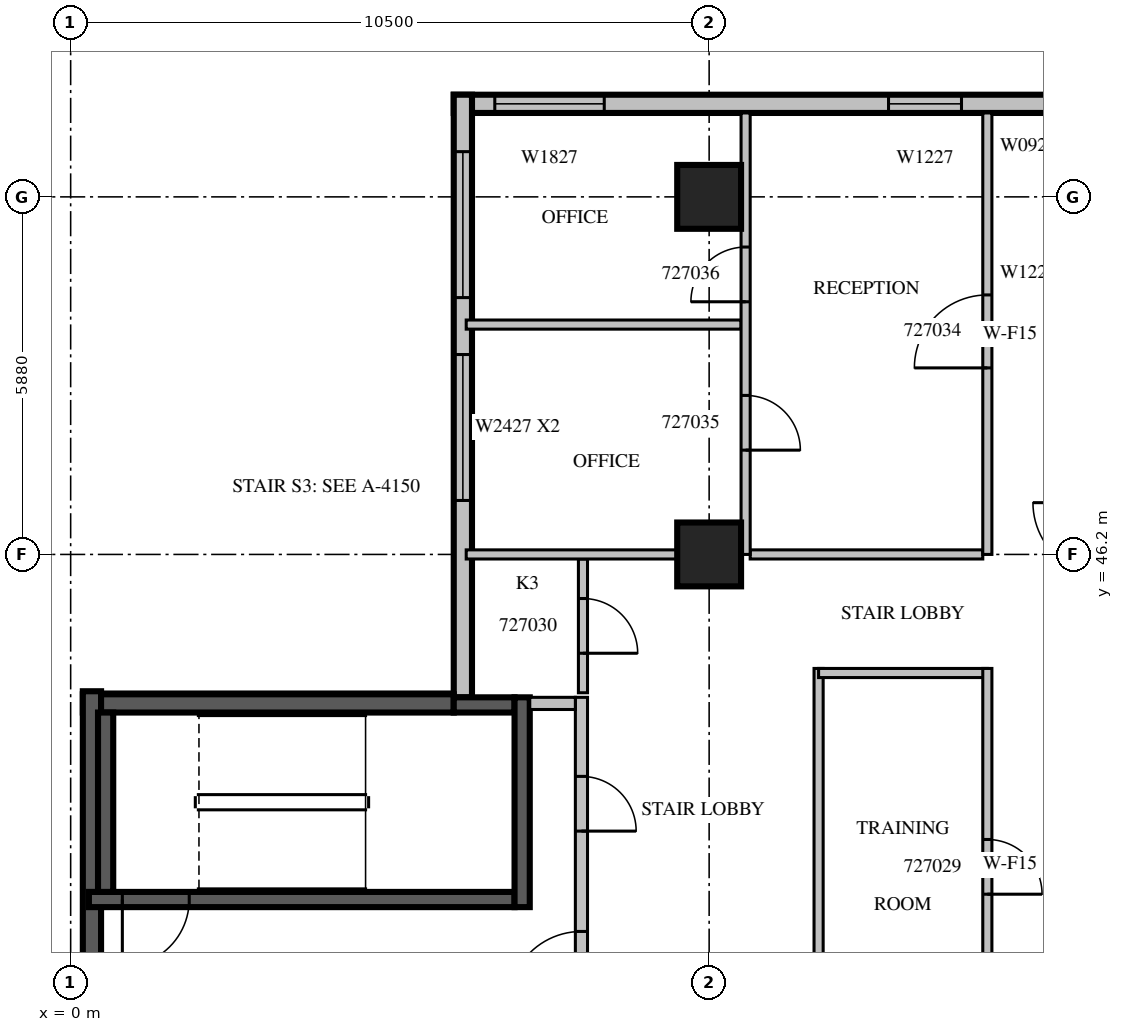
"""IFC4 building model, lengths in metres.
Left out: names, types, materials, properties, quantities, classifications, styles, units other than length and angle.
Written with IfcOpenShell. Run it as: python <this file> out.ifc"""

import sys

from ifc_helpers import new_model, si_unit, direction, frame, frame_2d, origin, origin_2d, place, context, subcontext, project, spatial, rectangle, extrude, source, transform, mapped, element, fill, save


model = new_model("IFC4")
c1 = context("Model", 3, precision=1e-05, world=origin(), true_north=direction((0.0, 1.0)))
c2 = subcontext(c1, "Body", "Model", "MODEL_VIEW")
j1 = project(units=[si_unit("LENGTHUNIT", "METRE"), si_unit("PLANEANGLEUNIT", "RADIAN")], contexts=[c1])
p1 = place(None, origin())
s1 = spatial("IfcSite", under=j1, at=p1, CompositionType="ELEMENT")
p2 = place(p1, origin())
s2 = spatial("IfcBuilding", under=s1, at=p2, CompositionType="ELEMENT")
p3 = place(p2, frame((0.0, 0.0, 124.5)))
s3 = spatial("IfcBuildingStorey", under=s2, at=p3, CompositionType="ELEMENT", Elevation=124.5)
m1 = source(origin(), c2, "Body", "SweptSolid", [
    extrude(rectangle(XDim=1.05, YDim=1.05, at=origin_2d()), origin(), (0.0, 0.0, 1.0), 4.2),
])
for number, where, z_axis, x_axis in (
    (1, (10.5, 46.2, 0.0), (0.0, 0.0, 1.0), (1.0, 0.0, 0.0)),
    (2, (10.5, 52.08, 0.0), (0.0, 0.0, 1.0), (1.0, 0.0, 0.0)),
):
    element("IfcColumn", number, at=place(p3, frame(where, z_axis=z_axis, x_axis=x_axis)), inside=s3, PredefinedType="COLUMN", context=c2, shape_type="MappedRepresentation", body=[
        mapped(m1, transform((0.0, 0.0, 0.0), scale=1.0)),
    ])
m2 = source(origin(), c2, "Body", "SweptSolid", [
    extrude(rectangle(XDim=10.5, YDim=0.3, at=frame_2d((5.25, 0.0))), origin(), (0.0, 0.0, 1.0), 3.8),
])
p4 = place(p3, frame((16.8, 53.61, 0.0), z_axis=(0.0, 0.0, 1.0), x_axis=(-1.0, 0.0, 0.0)))
e3 = element("IfcWall", 3, at=p4, inside=s3, PredefinedType="STANDARD", context=c2, shape_type="MappedRepresentation", body=[
    mapped(m2, transform((0.0, 0.0, 0.0), scale=1.0)),
])
m3 = source(origin(), c2, "Body", "SweptSolid", [
    extrude(rectangle(XDim=1.2, YDim=2.7, at=frame_2d((0.6, 1.35))), frame((0.0, 0.16, 0.0), z_axis=(0.0, -1.0, 0.0), x_axis=(1.0, 0.0, 0.0)), (0.0, 0.0, 1.0), 0.32),
])
p5 = place(p4, frame((2.15, 0.0, 0.6)))
e4 = element("IfcOpeningElement", 4, at=p5, cuts=e3, PredefinedType="OPENING", context=c2, shape_type="MappedRepresentation", body=[
    mapped(m3, transform((0.0, 0.0, 0.0), scale=1.0)),
])
m4 = source(origin(), c2, "Body", "SweptSolid", [
    extrude(rectangle(XDim=1.8, YDim=2.7, at=frame_2d((0.9, 1.35))), frame((0.0, 0.16, 0.0), z_axis=(0.0, -1.0, 0.0), x_axis=(1.0, 0.0, 0.0)), (0.0, 0.0, 1.0), 0.32),
])
p6 = place(p4, frame((8.025, 0.0, 0.6)))
e5 = element("IfcOpeningElement", 5, at=p6, cuts=e3, PredefinedType="OPENING", context=c2, shape_type="MappedRepresentation", body=[
    mapped(m4, transform((0.0, 0.0, 0.0), scale=1.0)),
])
m5 = source(origin(), c2, "Body", "SweptSolid", [
    extrude(rectangle(XDim=9.91, YDim=0.3, at=frame_2d((4.955, 0.0))), origin(), (0.0, 0.0, 1.0), 3.8),
])
p7 = place(p3, frame((6.45, 53.76, 0.0), z_axis=(0.0, 0.0, 1.0), x_axis=(0.0, -1.0, 0.0)))
e6 = element("IfcWall", 6, at=p7, inside=s3, PredefinedType="STANDARD", context=c2, shape_type="MappedRepresentation", body=[
    mapped(m5, transform((0.0, 0.0, 0.0), scale=1.0)),
])
m6 = source(origin(), c2, "Body", "SweptSolid", [
    extrude(rectangle(XDim=2.4, YDim=2.7, at=frame_2d((1.2, 1.35))), frame((0.0, 0.16, 0.0), z_axis=(0.0, -1.0, 0.0), x_axis=(1.0, 0.0, 0.0)), (0.0, 0.0, 1.0), 0.32),
])
p8 = place(p7, frame((4.272, 0.0, 0.6)))
e7 = element("IfcOpeningElement", 7, at=p8, cuts=e6, PredefinedType="OPENING", context=c2, shape_type="MappedRepresentation", body=[
    mapped(m6, transform((0.0, 0.0, 0.0), scale=1.0)),
])
p9 = place(p7, frame((0.936, 0.0, 0.6)))
e8 = element("IfcOpeningElement", 8, at=p9, cuts=e6, PredefinedType="OPENING", context=c2, shape_type="MappedRepresentation", body=[
    mapped(m6, transform((0.0, 0.0, 0.0), scale=1.0)),
])
m7 = source(origin(), c2, "Body", "SweptSolid", [
    extrude(rectangle(XDim=6.1, YDim=0.3, at=frame_2d((3.05, 0.0))), origin(), (0.0, 0.0, 1.0), 3.8),
])
p10 = place(p3, frame((6.3, 43.75, 0.0), z_axis=(0.0, 0.0, 1.0), x_axis=(-1.0, 0.0, 0.0)))
e9 = element("IfcWall", 9, at=p10, inside=s3, PredefinedType="SOLIDWALL", context=c2, shape_type="MappedRepresentation", body=[
    mapped(m7, transform((0.0, 0.0, 0.0), scale=1.0)),
])
m8 = source(origin(), c2, "Body", "SweptSolid", [
    extrude(rectangle(XDim=5.65, YDim=0.3, at=frame_2d((2.825, 0.0))), origin(), (0.0, 0.0, 1.0), 3.8),
])
p11 = place(p3, frame((0.35, 43.95, 0.0), z_axis=(0.0, 0.0, 1.0), x_axis=(0.0, -1.0, 0.0)))
e10 = element("IfcWall", 10, at=p11, inside=s3, PredefinedType="SOLIDWALL", context=c2, shape_type="MappedRepresentation", body=[
    mapped(m8, transform((0.0, 0.0, 0.0), scale=1.0)),
])
m9 = source(origin(), c2, "Body", "SweptSolid", [
    extrude(rectangle(XDim=7.0, YDim=0.25, at=frame_2d((3.5, 0.0))), origin(), (0.0, 0.0, 1.0), 3.8),
])
p12 = place(p3, frame((0.3, 40.525, 0.0), z_axis=(0.0, 0.0, 1.0), x_axis=(1.0, 0.0, 0.0)))
e11 = element("IfcWall", 11, at=p12, inside=s3, PredefinedType="SOLIDWALL", context=c2, shape_type="MappedRepresentation", body=[
    mapped(m9, transform((0.0, 0.0, 0.0), scale=1.0)),
])
m10 = source(origin(), c2, "Body", "SweptSolid", [
    extrude(rectangle(XDim=1.1, YDim=2.1, at=frame_2d((0.55, 1.05))), frame((0.0, 0.135, 0.0), z_axis=(0.0, -1.0, 0.0), x_axis=(1.0, 0.0, 0.0)), (0.0, 0.0, 1.0), 0.27),
])
p13 = place(p12, frame((0.55, 0.0, 0.0)))
e12 = element("IfcOpeningElement", 12, at=p13, cuts=e11, PredefinedType="OPENING", context=c2, shape_type="MappedRepresentation", body=[
    mapped(m10, transform((0.0, 0.0, 0.0), scale=1.0)),
])
m11 = source(origin(), c2, "Body", "SweptSolid", [
    extrude(rectangle(XDim=1.0, YDim=0.25, at=frame_2d((0.5, 0.0))), origin(), (0.0, 0.0, 1.0), 3.8),
])
p14 = place(p3, frame((6.3, 43.725, 0.0), z_axis=(0.0, 0.0, 1.0), x_axis=(1.0, 0.0, 0.0)))
e13 = element("IfcWall", 13, at=p14, inside=s3, PredefinedType="SOLIDWALL", context=c2, shape_type="MappedRepresentation", body=[
    mapped(m11, transform((0.0, 0.0, 0.0), scale=1.0)),
])
m12 = source(origin(), c2, "Body", "SweptSolid", [
    extrude(rectangle(XDim=3.45, YDim=0.25, at=frame_2d((1.725, 0.0))), origin(), (0.0, 0.0, 1.0), 3.8),
])
p15 = place(p3, frame((7.425, 40.4, 0.0), z_axis=(0.0, 0.0, 1.0), x_axis=(0.0, 1.0, 0.0)))
e14 = element("IfcWall", 14, at=p15, inside=s3, PredefinedType="SOLIDWALL", context=c2, shape_type="MappedRepresentation", body=[
    mapped(m12, transform((0.0, 0.0, 0.0), scale=1.0)),
])
m13 = source(origin(), c2, "Body", "SweptSolid", [
    extrude(rectangle(XDim=2.95, YDim=0.25, at=frame_2d((1.475, 0.0))), origin(), (0.0, 0.0, 1.0), 3.8),
])
p16 = place(p3, frame((0.575, 40.65, 0.0), z_axis=(0.0, 0.0, 1.0), x_axis=(0.0, 1.0, 0.0)))
e15 = element("IfcWall", 15, at=p16, inside=s3, PredefinedType="SOLIDWALL", context=c2, shape_type="MappedRepresentation", body=[
    mapped(m13, transform((0.0, 0.0, 0.0), scale=1.0)),
])
m14 = source(origin(), c2, "Body", "SweptSolid", [
    extrude(rectangle(XDim=5.45, YDim=0.2, at=frame_2d((2.725, 0.0))), origin(), (0.0, 0.0, 1.0), 3.8),
])
p17 = place(p3, frame((8.4, 38.4, 0.0), z_axis=(0.0, 0.0, 1.0), x_axis=(0.0, 1.0, 0.0)))
e16 = element("IfcWall", 16, at=p17, inside=s3, PredefinedType="PARTITIONING", context=c2, shape_type="MappedRepresentation", body=[
    mapped(m14, transform((0.0, 0.0, 0.0), scale=1.0)),
])
m15 = source(origin(), c2, "Body", "SweptSolid", [
    extrude(rectangle(XDim=1.2, YDim=2.1, at=frame_2d((0.6, 1.05))), frame((0.0, 0.11, 0.0), z_axis=(0.0, -1.0, 0.0), x_axis=(1.0, 0.0, 0.0)), (0.0, 0.0, 1.0), 0.22),
])
p18 = place(p17, frame((0.4, 0.0, 0.0)))
e17 = element("IfcOpeningElement", 17, at=p18, cuts=e16, PredefinedType="OPENING", context=c2, shape_type="MappedRepresentation", body=[
    mapped(m15, transform((0.0, 0.0, 0.0), scale=1.0)),
])
m16 = source(origin(), c2, "Body", "SweptSolid", [
    extrude(rectangle(XDim=0.9, YDim=2.1, at=frame_2d((0.45, 1.05))), frame((0.0, 0.11, 0.0), z_axis=(0.0, -1.0, 0.0), x_axis=(1.0, 0.0, 0.0)), (0.0, 0.0, 1.0), 0.22),
])
p19 = place(p17, frame((3.25, 0.0, 0.0)))
e18 = element("IfcOpeningElement", 18, at=p19, cuts=e16, PredefinedType="OPENING", context=c2, shape_type="MappedRepresentation", body=[
    mapped(m16, transform((0.0, 0.0, 0.0), scale=1.0)),
])
m17 = source(origin(), c2, "Body", "SweptSolid", [
    extrude(rectangle(XDim=0.75, YDim=0.2, at=frame_2d((0.375, 0.0))), origin(), (0.0, 0.0, 1.0), 3.8),
])
p20 = place(p3, frame((7.55, 43.75, 0.0), z_axis=(0.0, 0.0, 1.0), x_axis=(1.0, 0.0, 0.0)))
e19 = element("IfcWall", 19, at=p20, inside=s3, PredefinedType="PARTITIONING", context=c2, shape_type="MappedRepresentation", body=[
    mapped(m17, transform((0.0, 0.0, 0.0), scale=1.0)),
])
m18 = source(origin(), c2, "Body", "SweptSolid", [
    extrude(rectangle(XDim=6.45, YDim=0.15, at=frame_2d((3.225, 0.0))), origin(), (0.0, 0.0, 1.0), 3.8),
])
p21 = place(p3, frame((12.3, 44.325, 0.0), z_axis=(0.0, 0.0, 1.0), x_axis=(0.0, -1.0, 0.0)))
e20 = element("IfcWall", 20, at=p21, inside=s3, PredefinedType="PARTITIONING", context=c2, shape_type="MappedRepresentation", body=[
    mapped(m18, transform((0.0, 0.0, 0.0), scale=1.0)),
])
m19 = source(origin(), c2, "Body", "SweptSolid", [
    extrude(rectangle(XDim=2.775, YDim=0.15, at=frame_2d((1.387, 0.0))), origin(), (0.0, 0.0, 1.0), 3.8),
])
p22 = place(p3, frame((15.075, 44.25, 0.0), z_axis=(0.0, 0.0, 1.0), x_axis=(-1.0, 0.0, 0.0)))
e21 = element("IfcWall", 21, at=p22, inside=s3, PredefinedType="PARTITIONING", context=c2, shape_type="MappedRepresentation", body=[
    mapped(m19, transform((0.0, 0.0, 0.0), scale=1.0)),
])
p23 = place(p3, frame((15.075, 37.875, 0.0), z_axis=(0.0, 0.0, 1.0), x_axis=(0.0, 1.0, 0.0)))
e22 = element("IfcWall", 22, at=p23, inside=s3, PredefinedType="PARTITIONING", context=c2, shape_type="MappedRepresentation", body=[
    mapped(m18, transform((0.0, 0.0, 0.0), scale=1.0)),
])
m20 = source(origin(), c2, "Body", "SweptSolid", [
    extrude(rectangle(XDim=0.9, YDim=2.1, at=frame_2d((0.45, 1.05))), frame((0.0, 0.085, 0.0), z_axis=(0.0, -1.0, 0.0), x_axis=(1.0, 0.0, 0.0)), (0.0, 0.0, 1.0), 0.17),
])
p24 = place(p23, frame((2.737, 0.0, 0.0)))
e23 = element("IfcOpeningElement", 23, at=p24, cuts=e22, PredefinedType="OPENING", context=c2, shape_type="MappedRepresentation", body=[
    mapped(m20, transform((0.0, 0.0, 0.0), scale=1.0)),
])
m21 = source(origin(), c2, "Body", "SweptSolid", [
    extrude(rectangle(XDim=2.2, YDim=0.15, at=frame_2d((1.1, 0.0))), origin(), (0.0, 0.0, 1.0), 3.8),
])
p25 = place(p3, frame((8.425, 43.925, 0.0), z_axis=(0.0, 0.0, 1.0), x_axis=(0.0, 1.0, 0.0)))
e24 = element("IfcWall", 24, at=p25, inside=s3, PredefinedType="PARTITIONING", context=c2, shape_type="MappedRepresentation", body=[
    mapped(m21, transform((0.0, 0.0, 0.0), scale=1.0)),
])
p26 = place(p25, frame((0.65, 0.0, 0.0)))
e25 = element("IfcOpeningElement", 25, at=p26, cuts=e24, PredefinedType="OPENING", context=c2, shape_type="MappedRepresentation", body=[
    mapped(m20, transform((0.0, 0.0, 0.0), scale=1.0)),
])
m22 = source(origin(), c2, "Body", "SweptSolid", [
    extrude(rectangle(XDim=4.52, YDim=0.15, at=frame_2d((2.26, 0.0))), origin(), (0.0, 0.0, 1.0), 3.8),
])
p27 = place(p3, frame((11.025, 49.98, 0.0), z_axis=(0.0, 0.0, 1.0), x_axis=(-1.0, 0.0, 0.0)))
e26 = element("IfcWall", 26, at=p27, inside=s3, PredefinedType="PARTITIONING", context=c2, shape_type="MappedRepresentation", body=[
    mapped(m22, transform((0.0, 0.0, 0.0), scale=1.0)),
])
m23 = source(origin(), c2, "Body", "SweptSolid", [
    extrude(rectangle(XDim=3.471, YDim=0.15, at=frame_2d((1.736, 0.0))), origin(), (0.0, 0.0, 1.0), 3.8),
])
p28 = place(p3, frame((9.976, 46.2, 0.0), z_axis=(0.0, 0.0, 1.0), x_axis=(-1.0, 0.0, 0.0)))
e27 = element("IfcWall", 27, at=p28, inside=s3, PredefinedType="PARTITIONING", context=c2, shape_type="MappedRepresentation", body=[
    mapped(m23, transform((0.0, 0.0, 0.0), scale=1.0)),
])
m24 = source(origin(), c2, "Body", "SweptSolid", [
    extrude(rectangle(XDim=3.825, YDim=0.15, at=frame_2d((1.913, 0.0))), origin(), (0.0, 0.0, 1.0), 3.8),
])
p29 = place(p3, frame((15.0, 46.2, 0.0), z_axis=(0.0, 0.0, 1.0), x_axis=(-1.0, 0.0, 0.0)))
e28 = element("IfcWall", 28, at=p29, inside=s3, PredefinedType="PARTITIONING", context=c2, shape_type="MappedRepresentation", body=[
    mapped(m24, transform((0.0, 0.0, 0.0), scale=1.0)),
])
m25 = source(origin(), c2, "Body", "SweptSolid", [
    extrude(rectangle(XDim=7.26, YDim=0.15, at=frame_2d((3.63, 0.0))), origin(), (0.0, 0.0, 1.0), 3.8),
])
p30 = place(p3, frame((11.1, 46.2, 0.0), z_axis=(0.0, 0.0, 1.0), x_axis=(0.0, 1.0, 0.0)))
e29 = element("IfcWall", 29, at=p30, inside=s3, PredefinedType="PARTITIONING", context=c2, shape_type="MappedRepresentation", body=[
    mapped(m25, transform((0.0, 0.0, 0.0), scale=1.0)),
])
p31 = place(p30, frame((1.715, 0.0, 0.0)))
e30 = element("IfcOpeningElement", 30, at=p31, cuts=e29, PredefinedType="OPENING", context=c2, shape_type="MappedRepresentation", body=[
    mapped(m20, transform((0.0, 0.0, 0.0), scale=1.0)),
])
p32 = place(p30, frame((4.155, 0.0, 0.0)))
e31 = element("IfcOpeningElement", 31, at=p32, cuts=e29, PredefinedType="OPENING", context=c2, shape_type="MappedRepresentation", body=[
    mapped(m20, transform((0.0, 0.0, 0.0), scale=1.0)),
])
p33 = place(p3, frame((15.075, 46.2, 0.0), z_axis=(0.0, 0.0, 1.0), x_axis=(0.0, 1.0, 0.0)))
e32 = element("IfcWall", 32, at=p33, inside=s3, PredefinedType="PARTITIONING", context=c2, shape_type="MappedRepresentation", body=[
    mapped(m25, transform((0.0, 0.0, 0.0), scale=1.0)),
])
m26 = source(origin(), c2, "Body", "SweptSolid", [
    extrude(rectangle(XDim=1.2, YDim=2.1, at=frame_2d((0.6, 1.05))), frame((0.0, 0.085, 0.0), z_axis=(0.0, -1.0, 0.0), x_axis=(1.0, 0.0, 0.0)), (0.0, 0.0, 1.0), 0.17),
])
p34 = place(p33, frame((3.067, 0.0, 0.0)))
e33 = element("IfcOpeningElement", 33, at=p34, cuts=e32, PredefinedType="OPENING", context=c2, shape_type="MappedRepresentation", body=[
    mapped(m26, transform((0.0, 0.0, 0.0), scale=1.0)),
])
m27 = source(origin(), c2, "Body", "SweptSolid", [
    extrude(rectangle(XDim=1.2, YDim=2.7, at=frame_2d((0.6, 1.35))), frame((0.0, 0.03, 0.0), z_axis=(0.0, -1.0, 0.0), x_axis=(1.0, 0.0, 0.0)), (0.0, 0.0, 1.0), 0.06),
])
p35 = place(p5, origin())
e34 = element("IfcWindow", 34, at=p35, inside=s3, PartitioningType="SINGLE_PANEL", PredefinedType="WINDOW", context=c2, shape_type="MappedRepresentation", body=[
    mapped(m27, transform((0.0, 0.0, 0.0), scale=1.0)),
])
fill(e4, e34)
m28 = source(origin(), c2, "Body", "SweptSolid", [
    extrude(rectangle(XDim=1.8, YDim=2.7, at=frame_2d((0.9, 1.35))), frame((0.0, 0.03, 0.0), z_axis=(0.0, -1.0, 0.0), x_axis=(1.0, 0.0, 0.0)), (0.0, 0.0, 1.0), 0.06),
])
p36 = place(p6, origin())
e35 = element("IfcWindow", 35, at=p36, inside=s3, PartitioningType="SINGLE_PANEL", PredefinedType="WINDOW", context=c2, shape_type="MappedRepresentation", body=[
    mapped(m28, transform((0.0, 0.0, 0.0), scale=1.0)),
])
fill(e5, e35)
m29 = source(origin(), c2, "Body", "SweptSolid", [
    extrude(rectangle(XDim=2.4, YDim=2.7, at=frame_2d((1.2, 1.35))), frame((0.0, 0.03, 0.0), z_axis=(0.0, -1.0, 0.0), x_axis=(1.0, 0.0, 0.0)), (0.0, 0.0, 1.0), 0.06),
])
p37 = place(p8, origin())
e36 = element("IfcWindow", 36, at=p37, inside=s3, PartitioningType="SINGLE_PANEL", PredefinedType="WINDOW", context=c2, shape_type="MappedRepresentation", body=[
    mapped(m29, transform((0.0, 0.0, 0.0), scale=1.0)),
])
fill(e7, e36)
p38 = place(p9, origin())
e37 = element("IfcWindow", 37, at=p38, inside=s3, PartitioningType="SINGLE_PANEL", PredefinedType="WINDOW", context=c2, shape_type="MappedRepresentation", body=[
    mapped(m29, transform((0.0, 0.0, 0.0), scale=1.0)),
])
fill(e8, e37)
m30 = source(origin(), c2, "Body", "SweptSolid", [
    extrude(rectangle(XDim=1.1, YDim=2.1, at=frame_2d((0.55, 1.05))), frame((0.0, 0.025, 0.0), z_axis=(0.0, -1.0, 0.0), x_axis=(1.0, 0.0, 0.0)), (0.0, 0.0, 1.0), 0.05),
])
p39 = place(p13, origin())
e38 = element("IfcDoor", 38, at=p39, inside=s3, OperationType="SINGLE_SWING_RIGHT", PredefinedType="DOOR", context=c2, shape_type="MappedRepresentation", body=[
    mapped(m30, transform((0.0, 0.0, 0.0), scale=1.0)),
])
fill(e12, e38)
m31 = source(origin(), c2, "Body", "SweptSolid", [
    extrude(rectangle(XDim=1.2, YDim=2.1, at=frame_2d((0.6, 1.05))), frame((0.0, 0.025, 0.0), z_axis=(0.0, -1.0, 0.0), x_axis=(1.0, 0.0, 0.0)), (0.0, 0.0, 1.0), 0.05),
])
p40 = place(p18, origin())
e39 = element("IfcDoor", 39, at=p40, inside=s3, OperationType="SINGLE_SWING_LEFT", PredefinedType="DOOR", context=c2, shape_type="MappedRepresentation", body=[
    mapped(m31, transform((0.0, 0.0, 0.0), scale=1.0)),
])
fill(e17, e39)
m32 = source(origin(), c2, "Body", "SweptSolid", [
    extrude(rectangle(XDim=0.9, YDim=2.1, at=frame_2d((0.45, 1.05))), frame((0.0, 0.025, 0.0), z_axis=(0.0, -1.0, 0.0), x_axis=(1.0, 0.0, 0.0)), (0.0, 0.0, 1.0), 0.05),
])
p41 = place(p19, origin())
e40 = element("IfcDoor", 40, at=p41, inside=s3, OperationType="SINGLE_SWING_RIGHT", PredefinedType="DOOR", context=c2, shape_type="MappedRepresentation", body=[
    mapped(m32, transform((0.0, 0.0, 0.0), scale=1.0)),
])
fill(e18, e40)
p42 = place(p24, origin())
e41 = element("IfcDoor", 41, at=p42, inside=s3, OperationType="SINGLE_SWING_RIGHT", PredefinedType="DOOR", context=c2, shape_type="MappedRepresentation", body=[
    mapped(m32, transform((0.0, 0.0, 0.0), scale=1.0)),
])
fill(e23, e41)
p43 = place(p26, origin())
e42 = element("IfcDoor", 42, at=p43, inside=s3, OperationType="SINGLE_SWING_RIGHT", PredefinedType="DOOR", context=c2, shape_type="MappedRepresentation", body=[
    mapped(m32, transform((0.0, 0.0, 0.0), scale=1.0)),
])
fill(e25, e42)
p44 = place(p34, origin())
e43 = element("IfcDoor", 43, at=p44, inside=s3, OperationType="SINGLE_SWING_LEFT", PredefinedType="DOOR", context=c2, shape_type="MappedRepresentation", body=[
    mapped(m31, transform((0.0, 0.0, 0.0), scale=1.0)),
])
fill(e33, e43)
p45 = place(p31, origin())
e44 = element("IfcDoor", 44, at=p45, inside=s3, OperationType="SINGLE_SWING_RIGHT", PredefinedType="DOOR", context=c2, shape_type="MappedRepresentation", body=[
    mapped(m32, transform((0.0, 0.0, 0.0), scale=1.0)),
])
fill(e30, e44)
p46 = place(p32, origin())
e45 = element("IfcDoor", 45, at=p46, inside=s3, OperationType="SINGLE_SWING_LEFT", PredefinedType="DOOR", context=c2, shape_type="MappedRepresentation", body=[
    mapped(m32, transform((0.0, 0.0, 0.0), scale=1.0)),
])
fill(e31, e45)
save(model, sys.argv[1])
